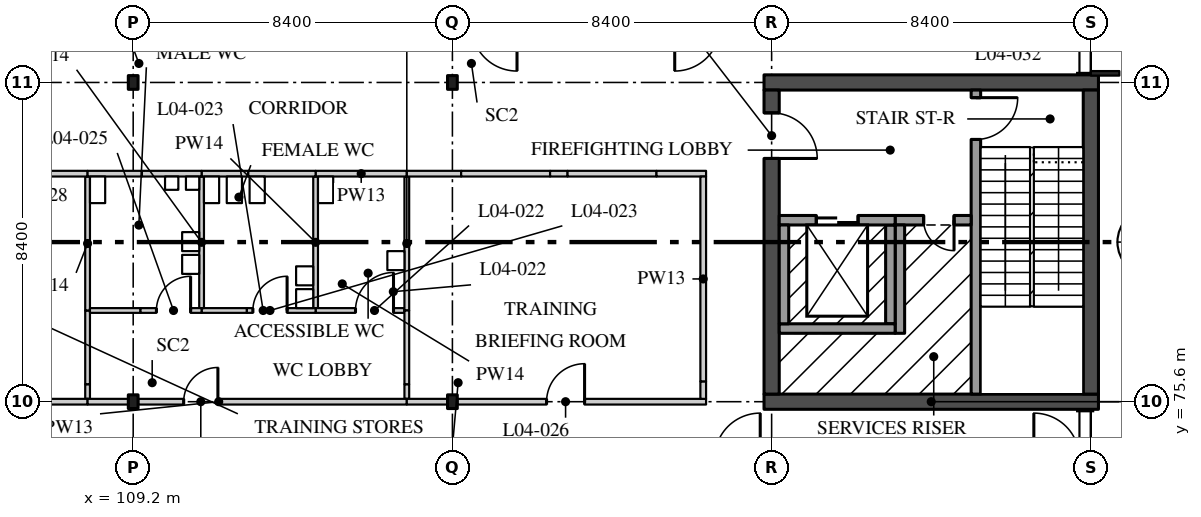
"""IFC4 building model, lengths in metres.
Left out: names, types, materials, properties, quantities, classifications, styles, units other than length and angle.
Written with IfcOpenShell. Run it as: python <this file> out.ifc"""

import sys

from ifc_helpers import new_model, si_unit, direction, frame, frame_2d, origin, origin_2d, place, context, subcontext, project, spatial, rectangle, i_section, extrude, element, fill, save


model = new_model("IFC4")
c1 = context("Model", 3, precision=1e-05, world=origin(), true_north=direction((0.0, 1.0)))
c2 = subcontext(c1, "Body", "Model", "MODEL_VIEW")
j1 = project(units=[si_unit("LENGTHUNIT", "METRE"), si_unit("PLANEANGLEUNIT", "RADIAN")], contexts=[c1])
p1 = place(None, origin())
s1 = spatial("IfcSite", under=j1, at=p1, CompositionType="ELEMENT")
p2 = place(p1, origin())
s2 = spatial("IfcBuilding", under=s1, at=p2, CompositionType="ELEMENT")
p3 = place(p2, frame((0.0, 0.0, 18.9)))
s3 = spatial("IfcBuildingStorey", under=s2, at=p3, CompositionType="ELEMENT", Elevation=18.9)
for number, where, z_axis, x_axis in (
    (1, (109.2, 75.6, 0.0), (0.0, 0.0, 1.0), (1.0, 0.0, 0.0)),
    (2, (109.2, 84.0, 0.0), (0.0, 0.0, 1.0), (1.0, 0.0, 0.0)),
    (3, (117.6, 75.6, 0.0), (0.0, 0.0, 1.0), (1.0, 0.0, 0.0)),
    (4, (117.6, 84.0, 0.0), (0.0, 0.0, 1.0), (1.0, 0.0, 0.0)),
):
    element("IfcColumn", number, at=place(p3, frame(where, z_axis=z_axis, x_axis=x_axis)), inside=s3, PredefinedType="COLUMN", context=c2, shape_type="SweptSolid", body=[
        extrude(i_section(OverallWidth=0.257, OverallDepth=0.361, WebThickness=0.011, FlangeThickness=0.02, FilletRadius=0.015, at=origin_2d()), origin(), (0.0, 0.0, 1.0), 4.37),
    ])
for number, where, z_axis, x_axis in (
    (5, (125.8, 75.6, 0.0), (0.0, 0.0, 1.0), (1.0, 0.0, 0.0)),
    (6, (125.8, 84.0, 0.0), (0.0, 0.0, 1.0), (1.0, 0.0, 0.0)),
):
    element("IfcWall", number, at=place(p3, frame(where, z_axis=z_axis, x_axis=x_axis)), inside=s3, PredefinedType="SHEAR", context=c2, shape_type="SweptSolid", body=[
        extrude(rectangle(XDim=8.8, YDim=0.4, at=frame_2d((4.4, 0.0))), origin(), (0.0, 0.0, 1.0), 4.37),
    ])
p4 = place(p3, frame((126.0, 75.8, 0.0), z_axis=(0.0, 0.0, 1.0), x_axis=(0.0, 1.0, 0.0)))
e7 = element("IfcWall", 7, at=p4, inside=s3, PredefinedType="SHEAR", context=c2, shape_type="SweptSolid", body=[
    extrude(rectangle(XDim=8.0, YDim=0.4, at=frame_2d((4.0, 0.0))), origin(), (0.0, 0.0, 1.0), 4.37),
])
p5 = place(p4, frame((6.2, 0.0, 0.0)))
e8 = element("IfcOpeningElement", 8, at=p5, cuts=e7, PredefinedType="OPENING", context=c2, shape_type="SweptSolid", body=[
    extrude(rectangle(XDim=1.2, YDim=2.1, at=frame_2d((0.6, 1.05))), frame((0.0, 0.21, 0.0), z_axis=(0.0, -1.0, 0.0), x_axis=(1.0, 0.0, 0.0)), (0.0, 0.0, 1.0), 0.42),
])
p6 = place(p3, frame((134.4, 75.8, 0.0), z_axis=(0.0, 0.0, 1.0), x_axis=(0.0, 1.0, 0.0)))
e9 = element("IfcWall", 9, at=p6, inside=s3, PredefinedType="SHEAR", context=c2, shape_type="SweptSolid", body=[
    extrude(rectangle(XDim=8.0, YDim=0.4, at=frame_2d((4.0, 0.0))), origin(), (0.0, 0.0, 1.0), 4.37),
])
p7 = place(p3, frame((131.375, 83.8, 0.0), z_axis=(0.0, 0.0, 1.0), x_axis=(0.0, -1.0, 0.0)))
e10 = element("IfcWall", 10, at=p7, inside=s3, PredefinedType="SOLIDWALL", context=c2, shape_type="SweptSolid", body=[
    extrude(rectangle(XDim=8.0, YDim=0.25, at=frame_2d((4.0, 0.0))), origin(), (0.0, 0.0, 1.0), 4.37),
])
p8 = place(p7, frame((0.2, 0.0, 0.0)))
e11 = element("IfcOpeningElement", 11, at=p8, cuts=e10, PredefinedType="OPENING", context=c2, shape_type="SweptSolid", body=[
    extrude(rectangle(XDim=1.1, YDim=2.1, at=frame_2d((0.55, 1.05))), frame((0.0, 0.135, 0.0), z_axis=(0.0, -1.0, 0.0), x_axis=(1.0, 0.0, 0.0)), (0.0, 0.0, 1.0), 0.27),
])
p9 = place(p3, frame((131.25, 80.375, 0.0), z_axis=(0.0, 0.0, 1.0), x_axis=(-1.0, 0.0, 0.0)))
e12 = element("IfcWall", 12, at=p9, inside=s3, PredefinedType="SOLIDWALL", context=c2, shape_type="SweptSolid", body=[
    extrude(rectangle(XDim=2.0, YDim=0.25, at=frame_2d((1.0, 0.0))), origin(), (0.0, 0.0, 1.0), 4.37),
])
p10 = place(p9, frame((0.45, 0.0, 0.0)))
e13 = element("IfcOpeningElement", 13, at=p10, cuts=e12, PredefinedType="OPENING", context=c2, shape_type="SweptSolid", body=[
    extrude(rectangle(XDim=0.8, YDim=2.1, at=frame_2d((0.4, 1.05))), frame((0.0, 0.135, 0.0), z_axis=(0.0, -1.0, 0.0), x_axis=(1.0, 0.0, 0.0)), (0.0, 0.0, 1.0), 0.27),
])
p11 = place(p3, frame((129.375, 80.25, 0.0), z_axis=(0.0, 0.0, 1.0), x_axis=(0.0, -1.0, 0.0)))
e14 = element("IfcWall", 14, at=p11, inside=s3, PredefinedType="SOLIDWALL", context=c2, shape_type="SweptSolid", body=[
    extrude(rectangle(XDim=2.85, YDim=0.25, at=frame_2d((1.425, 0.0))), origin(), (0.0, 0.0, 1.0), 4.37),
])
p12 = place(p3, frame((129.125, 77.65, 0.0), z_axis=(0.0, 0.0, 1.0), x_axis=(0.0, 1.0, 0.0)))
e15 = element("IfcWall", 15, at=p12, inside=s3, PredefinedType="SOLIDWALL", context=c2, shape_type="SweptSolid", body=[
    extrude(rectangle(XDim=2.6, YDim=0.25, at=frame_2d((1.3, 0.0))), origin(), (0.0, 0.0, 1.0), 4.37),
])
p13 = place(p3, frame((126.2, 80.375, 0.0), z_axis=(0.0, 0.0, 1.0), x_axis=(1.0, 0.0, 0.0)))
e16 = element("IfcWall", 16, at=p13, inside=s3, PredefinedType="SOLIDWALL", context=c2, shape_type="SweptSolid", body=[
    extrude(rectangle(XDim=3.05, YDim=0.25, at=frame_2d((1.525, 0.0))), origin(), (0.0, 0.0, 1.0), 4.37),
])
p14 = place(p13, frame((0.975, 0.0, 0.0)))
e17 = element("IfcOpeningElement", 17, at=p14, cuts=e16, PredefinedType="OPENING", context=c2, shape_type="SweptSolid", body=[
    extrude(rectangle(XDim=1.1, YDim=2.1, at=frame_2d((0.55, 1.05))), frame((0.0, 0.135, 0.0), z_axis=(0.0, -1.0, 0.0), x_axis=(1.0, 0.0, 0.0)), (0.0, 0.0, 1.0), 0.27),
])
p15 = place(p3, frame((126.2, 77.525, 0.0), z_axis=(0.0, 0.0, 1.0), x_axis=(1.0, 0.0, 0.0)))
e18 = element("IfcWall", 18, at=p15, inside=s3, PredefinedType="SOLIDWALL", context=c2, shape_type="SweptSolid", body=[
    extrude(rectangle(XDim=3.05, YDim=0.25, at=frame_2d((1.525, 0.0))), origin(), (0.0, 0.0, 1.0), 4.37),
])
p16 = place(p3, frame((126.325, 77.65, 0.0), z_axis=(0.0, 0.0, 1.0), x_axis=(0.0, 1.0, 0.0)))
e19 = element("IfcWall", 19, at=p16, inside=s3, PredefinedType="SOLIDWALL", context=c2, shape_type="SweptSolid", body=[
    extrude(rectangle(XDim=2.6, YDim=0.25, at=frame_2d((1.3, 0.0))), origin(), (0.0, 0.0, 1.0), 4.37),
])
p17 = place(p3, frame((108.0, 75.675, 0.0), z_axis=(0.0, 0.0, 1.0), x_axis=(0.0, 1.0, 0.0)))
e20 = element("IfcWall", 20, at=p17, inside=s3, PredefinedType="PARTITIONING", context=c2, shape_type="SweptSolid", body=[
    extrude(rectangle(XDim=0.385, YDim=0.125, at=frame_2d((0.192, 0.0))), origin(), (0.0, 0.0, 1.0), 3.819),
])
p18 = place(p3, frame((108.0, 76.06, 0.0), z_axis=(0.0, 0.0, 1.0), x_axis=(0.0, 1.0, 0.0)))
e21 = element("IfcWall", 21, at=p18, inside=s3, PredefinedType="PARTITIONING", context=c2, shape_type="SweptSolid", body=[
    extrude(rectangle(XDim=1.94, YDim=0.125, at=frame_2d((0.97, 0.0))), origin(), (0.0, 0.0, 1.0), 4.37),
])
p19 = place(p3, frame((108.0, 78.0, 0.0), z_axis=(0.0, 0.0, 1.0), x_axis=(0.0, 1.0, 0.0)))
e22 = element("IfcWall", 22, at=p19, inside=s3, PredefinedType="PARTITIONING", context=c2, shape_type="SweptSolid", body=[
    extrude(rectangle(XDim=3.525, YDim=0.125, at=frame_2d((1.762, 0.0))), origin(), (0.0, 0.0, 1.0), 4.37),
])
p20 = place(p3, frame((102.675, 75.6, 0.0), z_axis=(0.0, 0.0, 1.0), x_axis=(1.0, 0.0, 0.0)))
e23 = element("IfcWall", 23, at=p20, inside=s3, PredefinedType="PARTITIONING", context=c2, shape_type="SweptSolid", body=[
    extrude(rectangle(XDim=5.325, YDim=0.15, at=frame_2d((2.663, 0.0))), origin(), (0.0, 0.0, 1.0), 3.819),
])
p21 = place(p3, frame((106.17, 81.6, 0.0), z_axis=(0.0, 0.0, 1.0), x_axis=(1.0, 0.0, 0.0)))
e24 = element("IfcWall", 24, at=p21, inside=s3, PredefinedType="PARTITIONING", context=c2, shape_type="SweptSolid", body=[
    extrude(rectangle(XDim=1.83, YDim=0.15, at=frame_2d((0.915, 0.0))), origin(), (0.0, 0.0, 1.0), 3.946),
])
p22 = place(p3, frame((114.0, 78.062, 0.0), z_axis=(0.0, 0.0, 1.0), x_axis=(0.0, 1.0, 0.0)))
e25 = element("IfcWall", 25, at=p22, inside=s3, PredefinedType="PARTITIONING", context=c2, shape_type="SweptSolid", body=[
    extrude(rectangle(XDim=3.463, YDim=0.125, at=frame_2d((1.731, 0.0))), origin(), (0.0, 0.0, 1.0), 4.37),
])
p23 = place(p3, frame((114.0, 78.0, 0.0), z_axis=(0.0, 0.0, 1.0), x_axis=(1.0, 0.0, 0.0)))
e26 = element("IfcWall", 26, at=p23, inside=s3, PredefinedType="PARTITIONING", context=c2, shape_type="SweptSolid", body=[
    extrude(rectangle(XDim=2.338, YDim=0.125, at=frame_2d((1.169, 0.0))), origin(), (0.0, 0.0, 1.0), 3.946),
])
p24 = place(p23, frame((1.05, 0.0, 0.0)))
e27 = element("IfcOpeningElement", 27, at=p24, cuts=e26, PredefinedType="OPENING", context=c2, shape_type="SweptSolid", body=[
    extrude(rectangle(XDim=1.0, YDim=2.1, at=frame_2d((0.5, 1.05))), frame((0.0, 0.073, 0.0), z_axis=(0.0, -1.0, 0.0), x_axis=(1.0, 0.0, 0.0)), (0.0, 0.0, 1.0), 0.145),
])
p25 = place(p3, frame((116.4, 78.0, 0.0), z_axis=(0.0, 0.0, 1.0), x_axis=(0.0, 1.0, 0.0)))
e28 = element("IfcWall", 28, at=p25, inside=s3, PredefinedType="PARTITIONING", context=c2, shape_type="SweptSolid", body=[
    extrude(rectangle(XDim=3.525, YDim=0.125, at=frame_2d((1.762, 0.0))), origin(), (0.0, 0.0, 1.0), 4.37),
])
p26 = place(p3, frame((114.0, 81.6, 0.0), z_axis=(0.0, 0.0, 1.0), x_axis=(1.0, 0.0, 0.0)))
e29 = element("IfcWall", 29, at=p26, inside=s3, PredefinedType="PARTITIONING", context=c2, shape_type="SweptSolid", body=[
    extrude(rectangle(XDim=2.4, YDim=0.15, at=frame_2d((1.2, 0.0))), origin(), (0.0, 0.0, 1.0), 3.946),
])
p27 = place(p3, frame((111.0, 78.0, 0.0), z_axis=(0.0, 0.0, 1.0), x_axis=(1.0, 0.0, 0.0)))
e30 = element("IfcWall", 30, at=p27, inside=s3, PredefinedType="PARTITIONING", context=c2, shape_type="SweptSolid", body=[
    extrude(rectangle(XDim=1.192, YDim=0.125, at=frame_2d((0.596, 0.0))), origin(), (0.0, 0.0, 1.0), 3.946),
])
p28 = place(p3, frame((112.192, 78.0, 0.0), z_axis=(0.0, 0.0, 1.0), x_axis=(1.0, 0.0, 0.0)))
e31 = element("IfcWall", 31, at=p28, inside=s3, PredefinedType="PARTITIONING", context=c2, shape_type="SweptSolid", body=[
    extrude(rectangle(XDim=1.808, YDim=0.125, at=frame_2d((0.904, 0.0))), origin(), (0.0, 0.0, 1.0), 4.37),
])
p29 = place(p28, frame((0.158, 0.0, 0.0)))
e32 = element("IfcOpeningElement", 32, at=p29, cuts=e31, PredefinedType="OPENING", context=c2, shape_type="SweptSolid", body=[
    extrude(rectangle(XDim=0.9, YDim=2.1, at=frame_2d((0.45, 1.05))), frame((0.0, 0.073, 0.0), z_axis=(0.0, -1.0, 0.0), x_axis=(1.0, 0.0, 0.0)), (0.0, 0.0, 1.0), 0.145),
])
p30 = place(p3, frame((111.0, 78.062, 0.0), z_axis=(0.0, 0.0, 1.0), x_axis=(0.0, 1.0, 0.0)))
e33 = element("IfcWall", 33, at=p30, inside=s3, PredefinedType="PARTITIONING", context=c2, shape_type="SweptSolid", body=[
    extrude(rectangle(XDim=3.463, YDim=0.125, at=frame_2d((1.731, 0.0))), origin(), (0.0, 0.0, 1.0), 4.37),
])
p31 = place(p3, frame((111.0, 81.6, 0.0), z_axis=(0.0, 0.0, 1.0), x_axis=(1.0, 0.0, 0.0)))
e34 = element("IfcWall", 34, at=p31, inside=s3, PredefinedType="PARTITIONING", context=c2, shape_type="SweptSolid", body=[
    extrude(rectangle(XDim=1.23, YDim=0.15, at=frame_2d((0.615, 0.0))), origin(), (0.0, 0.0, 1.0), 3.946),
])
p32 = place(p3, frame((112.23, 81.6, 0.0), z_axis=(0.0, 0.0, 1.0), x_axis=(1.0, 0.0, 0.0)))
e35 = element("IfcWall", 35, at=p32, inside=s3, PredefinedType="PARTITIONING", context=c2, shape_type="SweptSolid", body=[
    extrude(rectangle(XDim=1.77, YDim=0.15, at=frame_2d((0.885, 0.0))), origin(), (0.0, 0.0, 1.0), 4.37),
])
p33 = place(p3, frame((108.062, 78.0, 0.0), z_axis=(0.0, 0.0, 1.0), x_axis=(1.0, 0.0, 0.0)))
e36 = element("IfcWall", 36, at=p33, inside=s3, PredefinedType="PARTITIONING", context=c2, shape_type="SweptSolid", body=[
    extrude(rectangle(XDim=1.33, YDim=0.125, at=frame_2d((0.665, 0.0))), origin(), (0.0, 0.0, 1.0), 3.819),
])
p34 = place(p3, frame((109.392, 78.0, 0.0), z_axis=(0.0, 0.0, 1.0), x_axis=(1.0, 0.0, 0.0)))
e37 = element("IfcWall", 37, at=p34, inside=s3, PredefinedType="PARTITIONING", context=c2, shape_type="SweptSolid", body=[
    extrude(rectangle(XDim=1.608, YDim=0.125, at=frame_2d((0.804, 0.0))), origin(), (0.0, 0.0, 1.0), 4.37),
])
p35 = place(p34, frame((0.419, 0.0, 0.0)))
e38 = element("IfcOpeningElement", 38, at=p35, cuts=e37, PredefinedType="OPENING", context=c2, shape_type="SweptSolid", body=[
    extrude(rectangle(XDim=0.9, YDim=2.1, at=frame_2d((0.45, 1.05))), frame((0.0, 0.073, 0.0), z_axis=(0.0, -1.0, 0.0), x_axis=(1.0, 0.0, 0.0)), (0.0, 0.0, 1.0), 0.145),
])
p36 = place(p3, frame((116.4, 75.675, 0.0), z_axis=(0.0, 0.0, 1.0), x_axis=(0.0, 1.0, 0.0)))
e39 = element("IfcWall", 39, at=p36, inside=s3, PredefinedType="PARTITIONING", context=c2, shape_type="SweptSolid", body=[
    extrude(rectangle(XDim=0.385, YDim=0.125, at=frame_2d((0.192, 0.0))), origin(), (0.0, 0.0, 1.0), 3.819),
])
p37 = place(p3, frame((116.4, 76.06, 0.0), z_axis=(0.0, 0.0, 1.0), x_axis=(0.0, 1.0, 0.0)))
e40 = element("IfcWall", 40, at=p37, inside=s3, PredefinedType="PARTITIONING", context=c2, shape_type="SweptSolid", body=[
    extrude(rectangle(XDim=1.94, YDim=0.125, at=frame_2d((0.97, 0.0))), origin(), (0.0, 0.0, 1.0), 4.37),
])
p38 = place(p3, frame((108.0, 75.6, 0.0), z_axis=(0.0, 0.0, 1.0), x_axis=(1.0, 0.0, 0.0)))
e41 = element("IfcWall", 41, at=p38, inside=s3, PredefinedType="PARTITIONING", context=c2, shape_type="SweptSolid", body=[
    extrude(rectangle(XDim=1.072, YDim=0.15, at=frame_2d((0.536, 0.0))), origin(), (0.0, 0.0, 1.0), 3.819),
])
p39 = place(p3, frame((109.329, 75.6, 0.0), z_axis=(0.0, 0.0, 1.0), x_axis=(1.0, 0.0, 0.0)))
e42 = element("IfcWall", 42, at=p39, inside=s3, PredefinedType="PARTITIONING", context=c2, shape_type="SweptSolid", body=[
    extrude(rectangle(XDim=7.071, YDim=0.15, at=frame_2d((3.535, 0.0))), origin(), (0.0, 0.0, 1.0), 3.819),
])
p40 = place(p39, frame((1.2, 0.0, 0.0)))
e43 = element("IfcOpeningElement", 43, at=p40, cuts=e42, PredefinedType="OPENING", context=c2, shape_type="SweptSolid", body=[
    extrude(rectangle(XDim=0.9, YDim=2.1, at=frame_2d((0.45, 1.05))), frame((0.0, 0.085, 0.0), z_axis=(0.0, -1.0, 0.0), x_axis=(1.0, 0.0, 0.0)), (0.0, 0.0, 1.0), 0.17),
])
p41 = place(p3, frame((108.0, 81.6, 0.0), z_axis=(0.0, 0.0, 1.0), x_axis=(1.0, 0.0, 0.0)))
e44 = element("IfcWall", 44, at=p41, inside=s3, PredefinedType="PARTITIONING", context=c2, shape_type="SweptSolid", body=[
    extrude(rectangle(XDim=1.43, YDim=0.15, at=frame_2d((0.715, 0.0))), origin(), (0.0, 0.0, 1.0), 3.819),
])
p42 = place(p3, frame((109.43, 81.6, 0.0), z_axis=(0.0, 0.0, 1.0), x_axis=(1.0, 0.0, 0.0)))
e45 = element("IfcWall", 45, at=p42, inside=s3, PredefinedType="PARTITIONING", context=c2, shape_type="SweptSolid", body=[
    extrude(rectangle(XDim=1.57, YDim=0.15, at=frame_2d((0.785, 0.0))), origin(), (0.0, 0.0, 1.0), 4.37),
])
p43 = place(p3, frame((116.4, 75.6, 0.0), z_axis=(0.0, 0.0, 1.0), x_axis=(1.0, 0.0, 0.0)))
e46 = element("IfcWall", 46, at=p43, inside=s3, PredefinedType="PARTITIONING", context=c2, shape_type="SweptSolid", body=[
    extrude(rectangle(XDim=1.071, YDim=0.15, at=frame_2d((0.536, 0.0))), origin(), (0.0, 0.0, 1.0), 3.819),
])
p44 = place(p3, frame((117.728, 75.6, 0.0), z_axis=(0.0, 0.0, 1.0), x_axis=(1.0, 0.0, 0.0)))
e47 = element("IfcWall", 47, at=p44, inside=s3, PredefinedType="PARTITIONING", context=c2, shape_type="SweptSolid", body=[
    extrude(rectangle(XDim=6.547, YDim=0.15, at=frame_2d((3.273, 0.0))), origin(), (0.0, 0.0, 1.0), 3.819),
])
p45 = place(p44, frame((2.35, 0.0, 0.0)))
e48 = element("IfcOpeningElement", 48, at=p45, cuts=e47, PredefinedType="OPENING", context=c2, shape_type="SweptSolid", body=[
    extrude(rectangle(XDim=1.0, YDim=2.1, at=frame_2d((0.5, 1.05))), frame((0.0, 0.085, 0.0), z_axis=(0.0, -1.0, 0.0), x_axis=(1.0, 0.0, 0.0)), (0.0, 0.0, 1.0), 0.17),
])
p46 = place(p3, frame((116.4, 81.6, 0.0), z_axis=(0.0, 0.0, 1.0), x_axis=(1.0, 0.0, 0.0)))
e49 = element("IfcWall", 49, at=p46, inside=s3, PredefinedType="PARTITIONING", context=c2, shape_type="SweptSolid", body=[
    extrude(rectangle(XDim=1.43, YDim=0.15, at=frame_2d((0.715, 0.0))), origin(), (0.0, 0.0, 1.0), 3.819),
])
p47 = place(p3, frame((117.83, 81.6, 0.0), z_axis=(0.0, 0.0, 1.0), x_axis=(1.0, 0.0, 0.0)))
e50 = element("IfcWall", 50, at=p47, inside=s3, PredefinedType="PARTITIONING", context=c2, shape_type="SweptSolid", body=[
    extrude(rectangle(XDim=2.34, YDim=0.15, at=frame_2d((1.17, 0.0))), origin(), (0.0, 0.0, 1.0), 4.37),
])
p48 = place(p3, frame((120.17, 81.6, 0.0), z_axis=(0.0, 0.0, 1.0), x_axis=(1.0, 0.0, 0.0)))
e51 = element("IfcWall", 51, at=p48, inside=s3, PredefinedType="PARTITIONING", context=c2, shape_type="SweptSolid", body=[
    extrude(rectangle(XDim=0.46, YDim=0.15, at=frame_2d((0.23, 0.0))), origin(), (0.0, 0.0, 1.0), 3.946),
])
p49 = place(p3, frame((120.63, 81.6, 0.0), z_axis=(0.0, 0.0, 1.0), x_axis=(1.0, 0.0, 0.0)))
e52 = element("IfcWall", 52, at=p49, inside=s3, PredefinedType="PARTITIONING", context=c2, shape_type="SweptSolid", body=[
    extrude(rectangle(XDim=2.34, YDim=0.15, at=frame_2d((1.17, 0.0))), origin(), (0.0, 0.0, 1.0), 4.37),
])
p50 = place(p3, frame((122.97, 81.6, 0.0), z_axis=(0.0, 0.0, 1.0), x_axis=(1.0, 0.0, 0.0)))
e53 = element("IfcWall", 53, at=p50, inside=s3, PredefinedType="PARTITIONING", context=c2, shape_type="SweptSolid", body=[
    extrude(rectangle(XDim=1.305, YDim=0.15, at=frame_2d((0.652, 0.0))), origin(), (0.0, 0.0, 1.0), 3.946),
])
p51 = place(p3, frame((124.2, 75.675, 0.0), z_axis=(0.0, 0.0, 1.0), x_axis=(0.0, 1.0, 0.0)))
e54 = element("IfcWall", 54, at=p51, inside=s3, PredefinedType="PARTITIONING", context=c2, shape_type="SweptSolid", body=[
    extrude(rectangle(XDim=0.46, YDim=0.15, at=frame_2d((0.23, 0.0))), origin(), (0.0, 0.0, 1.0), 3.819),
])
p52 = place(p3, frame((124.2, 76.135, 0.0), z_axis=(0.0, 0.0, 1.0), x_axis=(0.0, 1.0, 0.0)))
e55 = element("IfcWall", 55, at=p52, inside=s3, PredefinedType="PARTITIONING", context=c2, shape_type="SweptSolid", body=[
    extrude(rectangle(XDim=5.39, YDim=0.15, at=frame_2d((2.695, 0.0))), origin(), (0.0, 0.0, 1.0), 4.37),
])
p53 = place(p5, frame((1.2, 0.0, 0.0), z_axis=(0.0, 0.0, 1.0), x_axis=(-1.0, 0.0, 0.0)))
e56 = element("IfcDoor", 56, at=p53, inside=s3, OperationType="SINGLE_SWING_LEFT", PredefinedType="DOOR", context=c2, shape_type="SweptSolid", body=[
    extrude(rectangle(XDim=1.2, YDim=2.1, at=frame_2d((0.6, 1.05))), frame((0.0, 0.035, 0.0), z_axis=(0.0, -1.0, 0.0), x_axis=(1.0, 0.0, 0.0)), (0.0, 0.0, 1.0), 0.07),
])
fill(e8, e56)
p54 = place(p10, origin())
e57 = element("IfcDoor", 57, at=p54, inside=s3, OperationType="SINGLE_SWING_RIGHT", PredefinedType="DOOR", context=c2, shape_type="SweptSolid", body=[
    extrude(rectangle(XDim=0.8, YDim=2.1, at=frame_2d((0.4, 1.05))), frame((0.0, 0.035, 0.0), z_axis=(0.0, -1.0, 0.0), x_axis=(1.0, 0.0, 0.0)), (0.0, 0.0, 1.0), 0.07),
])
fill(e13, e57)
p55 = place(p8, origin())
e58 = element("IfcDoor", 58, at=p55, inside=s3, OperationType="SINGLE_SWING_RIGHT", PredefinedType="DOOR", context=c2, shape_type="SweptSolid", body=[
    extrude(rectangle(XDim=1.1, YDim=2.1, at=frame_2d((0.55, 1.05))), frame((0.0, 0.035, 0.0), z_axis=(0.0, -1.0, 0.0), x_axis=(1.0, 0.0, 0.0)), (0.0, 0.0, 1.0), 0.07),
])
fill(e11, e58)
p56 = place(p14, origin())
e59 = element("IfcDoor", 59, at=p56, inside=s3, OperationType="DOUBLE_DOOR_SLIDING", PredefinedType="DOOR", context=c2, shape_type="SweptSolid", body=[
    extrude(rectangle(XDim=1.1, YDim=2.1, at=frame_2d((0.55, 1.05))), frame((0.0, 0.04, 0.0), z_axis=(0.0, -1.0, 0.0), x_axis=(1.0, 0.0, 0.0)), (0.0, 0.0, 1.0), 0.08),
])
fill(e17, e59)
p57 = place(p24, origin())
e60 = element("IfcDoor", 60, at=p57, inside=s3, OperationType="SINGLE_SWING_LEFT", PredefinedType="DOOR", context=c2, shape_type="SweptSolid", body=[
    extrude(rectangle(XDim=1.0, YDim=2.1, at=frame_2d((0.5, 1.05))), frame((0.0, 0.02, 0.0), z_axis=(0.0, -1.0, 0.0), x_axis=(1.0, 0.0, 0.0)), (0.0, 0.0, 1.0), 0.04),
])
fill(e27, e60)
p58 = place(p29, origin())
e61 = element("IfcDoor", 61, at=p58, inside=s3, OperationType="SINGLE_SWING_LEFT", PredefinedType="DOOR", context=c2, shape_type="SweptSolid", body=[
    extrude(rectangle(XDim=0.9, YDim=2.1, at=frame_2d((0.45, 1.05))), frame((0.0, 0.02, 0.0), z_axis=(0.0, -1.0, 0.0), x_axis=(1.0, 0.0, 0.0)), (0.0, 0.0, 1.0), 0.04),
])
fill(e32, e61)
p59 = place(p40, origin())
e62 = element("IfcDoor", 62, at=p59, inside=s3, OperationType="SINGLE_SWING_LEFT", PredefinedType="DOOR", context=c2, shape_type="SweptSolid", body=[
    extrude(rectangle(XDim=0.9, YDim=2.1, at=frame_2d((0.45, 1.05))), frame((0.0, 0.025, 0.0), z_axis=(0.0, -1.0, 0.0), x_axis=(1.0, 0.0, 0.0)), (0.0, 0.0, 1.0), 0.05),
])
fill(e43, e62)
p60 = place(p35, origin())
e63 = element("IfcDoor", 63, at=p60, inside=s3, OperationType="SINGLE_SWING_LEFT", PredefinedType="DOOR", context=c2, shape_type="SweptSolid", body=[
    extrude(rectangle(XDim=0.9, YDim=2.1, at=frame_2d((0.45, 1.05))), frame((0.0, 0.02, 0.0), z_axis=(0.0, -1.0, 0.0), x_axis=(1.0, 0.0, 0.0)), (0.0, 0.0, 1.0), 0.04),
])
fill(e38, e63)
p61 = place(p45, origin())
e64 = element("IfcDoor", 64, at=p61, inside=s3, OperationType="SINGLE_SWING_LEFT", PredefinedType="DOOR", context=c2, shape_type="SweptSolid", body=[
    extrude(rectangle(XDim=1.0, YDim=2.1, at=frame_2d((0.5, 1.05))), frame((0.0, 0.025, 0.0), z_axis=(0.0, -1.0, 0.0), x_axis=(1.0, 0.0, 0.0)), (0.0, 0.0, 1.0), 0.05),
])
fill(e48, e64)
save(model, sys.argv[1])
